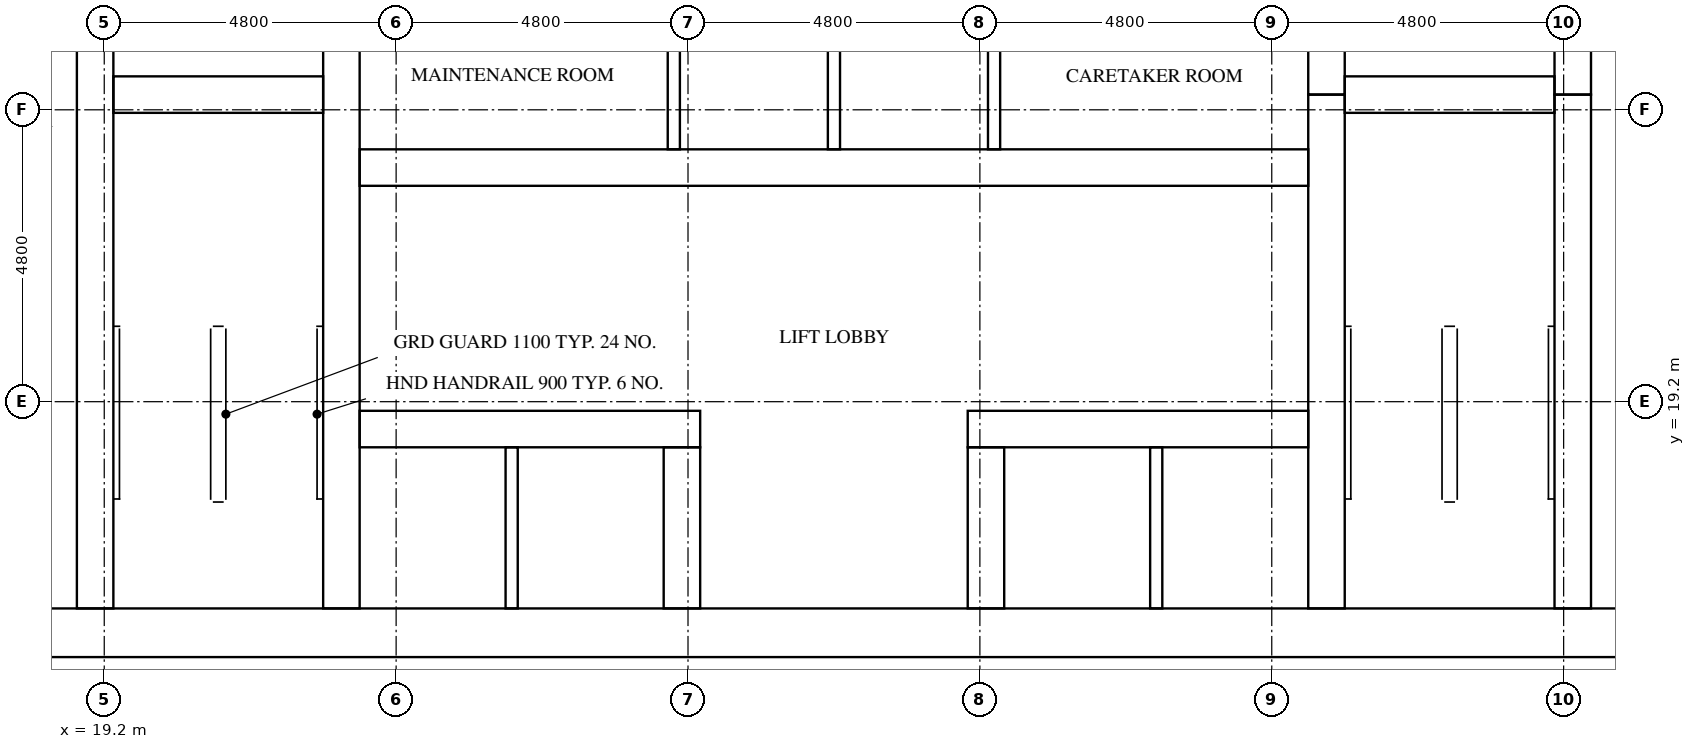
"""IFC4 building model, lengths in metres.
Left out: names, types, materials, properties, quantities, classifications, styles, units other than length and angle.
Written with IfcOpenShell. Run it as: python <this file> out.ifc"""

import sys

from ifc_helpers import new_model, si_unit, direction, frame, frame_2d, origin, place, context, subcontext, project, spatial, rectangle, extrude, element, fill, save


model = new_model("IFC4")
c1 = context("Model", 3, precision=1e-05, world=origin(), true_north=direction((0.0, 1.0)))
c2 = subcontext(c1, "Body", "Model", "MODEL_VIEW")
j1 = project(units=[si_unit("LENGTHUNIT", "METRE"), si_unit("PLANEANGLEUNIT", "RADIAN")], contexts=[c1])
p1 = place(None, origin())
s1 = spatial("IfcSite", under=j1, at=p1, CompositionType="ELEMENT")
p2 = place(p1, origin())
s2 = spatial("IfcBuilding", under=s1, at=p2, CompositionType="ELEMENT")
p3 = place(p2, frame((0.0, 0.0, 119.1)))
s3 = spatial("IfcBuildingStorey", under=s2, at=p3, CompositionType="ELEMENT", Elevation=119.1)
p4 = place(p3, frame((15.0, 15.4, 0.0), z_axis=(0.0, 0.0, 1.0), x_axis=(1.0, 0.0, 0.0)))
e1 = element("IfcWall", 1, at=p4, inside=s3, PredefinedType="SHEAR", context=c2, shape_type="SweptSolid", body=[
    extrude(rectangle(XDim=32.4, YDim=0.8, at=frame_2d((16.2, 0.0))), origin(), (0.0, 0.0, 1.0), 3.2),
])
p5 = place(p4, frame((15.3, 0.0, 0.0)))
e2 = element("IfcOpeningElement", 2, at=p5, cuts=e1, PredefinedType="OPENING", context=c2, shape_type="SweptSolid", body=[
    extrude(rectangle(XDim=1.8, YDim=2.1, at=frame_2d((0.9, 1.05))), frame((0.0, 0.41, 0.0), z_axis=(0.0, -1.0, 0.0), x_axis=(1.0, 0.0, 0.0)), (0.0, 0.0, 1.0), 0.82),
])
p6 = place(p3, frame((19.05, 15.8, 0.0), z_axis=(0.0, 0.0, 1.0), x_axis=(0.0, 1.0, 0.0)))
e3 = element("IfcWall", 3, at=p6, inside=s3, PredefinedType="SHEAR", context=c2, shape_type="SweptSolid", body=[
    extrude(rectangle(XDim=15.15, YDim=0.6, at=frame_2d((7.575, 0.0))), origin(), (0.0, 0.0, 1.0), 3.2),
])
p7 = place(p6, frame((9.65, 0.0, 0.0)))
e4 = element("IfcOpeningElement", 4, at=p7, cuts=e3, PredefinedType="OPENING", context=c2, shape_type="SweptSolid", body=[
    extrude(rectangle(XDim=1.1, YDim=2.1, at=frame_2d((0.55, 1.05))), frame((0.0, 0.31, 0.0), z_axis=(0.0, -1.0, 0.0), x_axis=(1.0, 0.0, 0.0)), (0.0, 0.0, 1.0), 0.62),
])
p8 = place(p6, frame((13.15, 0.0, 0.0)))
e5 = element("IfcOpeningElement", 5, at=p8, cuts=e3, PredefinedType="OPENING", context=c2, shape_type="SweptSolid", body=[
    extrude(rectangle(XDim=1.1, YDim=2.1, at=frame_2d((0.55, 1.05))), frame((0.0, 0.31, 0.0), z_axis=(0.0, -1.0, 0.0), x_axis=(1.0, 0.0, 0.0)), (0.0, 0.0, 1.0), 0.62),
])
p9 = place(p6, frame((0.4, 0.0, 0.0)))
e6 = element("IfcOpeningElement", 6, at=p9, cuts=e3, PredefinedType="OPENING", context=c2, shape_type="SweptSolid", body=[
    extrude(rectangle(XDim=1.2, YDim=2.1, at=frame_2d((0.6, 1.05))), frame((0.0, 0.31, 0.0), z_axis=(0.0, -1.0, 0.0), x_axis=(1.0, 0.0, 0.0)), (0.0, 0.0, 1.0), 0.62),
])
p10 = place(p3, frame((23.1, 15.8, 0.0), z_axis=(0.0, 0.0, 1.0), x_axis=(0.0, 1.0, 0.0)))
e7 = element("IfcWall", 7, at=p10, inside=s3, PredefinedType="SHEAR", context=c2, shape_type="SweptSolid", body=[
    extrude(rectangle(XDim=21.2, YDim=0.6, at=frame_2d((10.6, 0.0))), origin(), (0.0, 0.0, 1.0), 3.2),
])
p11 = place(p3, frame((39.3, 15.8, 0.0), z_axis=(0.0, 0.0, 1.0), x_axis=(0.0, 1.0, 0.0)))
e8 = element("IfcWall", 8, at=p11, inside=s3, PredefinedType="SHEAR", context=c2, shape_type="SweptSolid", body=[
    extrude(rectangle(XDim=8.45, YDim=0.6, at=frame_2d((4.225, 0.0))), origin(), (0.0, 0.0, 1.0), 3.2),
])
p12 = place(p3, frame((39.3, 24.25, 0.0), z_axis=(0.0, 0.0, 1.0), x_axis=(0.0, 1.0, 0.0)))
e9 = element("IfcWall", 9, at=p12, inside=s3, PredefinedType="SHEAR", context=c2, shape_type="SweptSolid", body=[
    extrude(rectangle(XDim=3.5, YDim=0.6, at=frame_2d((1.75, 0.0))), origin(), (0.0, 0.0, 1.0), 3.2),
])
p13 = place(p3, frame((43.35, 15.8, 0.0), z_axis=(0.0, 0.0, 1.0), x_axis=(0.0, 1.0, 0.0)))
e10 = element("IfcWall", 10, at=p13, inside=s3, PredefinedType="SHEAR", context=c2, shape_type="SweptSolid", body=[
    extrude(rectangle(XDim=8.45, YDim=0.6, at=frame_2d((4.225, 0.0))), origin(), (0.0, 0.0, 1.0), 3.2),
])
p14 = place(p13, frame((0.4, 0.0, 0.0)))
e11 = element("IfcOpeningElement", 11, at=p14, cuts=e10, PredefinedType="OPENING", context=c2, shape_type="SweptSolid", body=[
    extrude(rectangle(XDim=1.2, YDim=2.1, at=frame_2d((0.6, 1.05))), frame((0.0, 0.31, 0.0), z_axis=(0.0, -1.0, 0.0), x_axis=(1.0, 0.0, 0.0)), (0.0, 0.0, 1.0), 0.62),
])
p15 = place(p3, frame((43.35, 24.25, 0.0), z_axis=(0.0, 0.0, 1.0), x_axis=(0.0, 1.0, 0.0)))
e12 = element("IfcWall", 12, at=p15, inside=s3, PredefinedType="SHEAR", context=c2, shape_type="SweptSolid", body=[
    extrude(rectangle(XDim=3.5, YDim=0.6, at=frame_2d((1.75, 0.0))), origin(), (0.0, 0.0, 1.0), 3.2),
])
p16 = place(p15, frame((1.2, 0.0, 0.0)))
e13 = element("IfcOpeningElement", 13, at=p16, cuts=e12, PredefinedType="OPENING", context=c2, shape_type="SweptSolid", body=[
    extrude(rectangle(XDim=1.1, YDim=2.1, at=frame_2d((0.55, 1.05))), frame((0.0, 0.31, 0.0), z_axis=(0.0, -1.0, 0.0), x_axis=(1.0, 0.0, 0.0)), (0.0, 0.0, 1.0), 0.62),
])
for number, where, z_axis, x_axis in (
    (14, (19.35, 24.25, 0.0), (0.0, 0.0, 1.0), (1.0, 0.0, 0.0)),
    (15, (39.6, 24.25, 0.0), (0.0, 0.0, 1.0), (1.0, 0.0, 0.0)),
):
    element("IfcWall", number, at=place(p3, frame(where, z_axis=z_axis, x_axis=x_axis)), inside=s3, PredefinedType="SHEAR", context=c2, shape_type="SweptSolid", body=[
        extrude(rectangle(XDim=3.45, YDim=0.6, at=frame_2d((1.725, 0.0))), origin(), (0.0, 0.0, 1.0), 3.2),
    ])
p17 = place(p3, frame((23.4, 18.75, 0.0), z_axis=(0.0, 0.0, 1.0), x_axis=(1.0, 0.0, 0.0)))
e16 = element("IfcWall", 16, at=p17, inside=s3, PredefinedType="SHEAR", context=c2, shape_type="SweptSolid", body=[
    extrude(rectangle(XDim=5.6, YDim=0.6, at=frame_2d((2.8, 0.0))), origin(), (0.0, 0.0, 1.0), 3.2),
])
p18 = place(p17, frame((0.65, 0.0, 0.0)))
e17 = element("IfcOpeningElement", 17, at=p18, cuts=e16, PredefinedType="OPENING", context=c2, shape_type="SweptSolid", body=[
    extrude(rectangle(XDim=1.1, YDim=2.1, at=frame_2d((0.55, 1.05))), frame((0.0, 0.31, 0.0), z_axis=(0.0, -1.0, 0.0), x_axis=(1.0, 0.0, 0.0)), (0.0, 0.0, 1.0), 0.62),
])
p19 = place(p17, frame((3.25, 0.0, 0.0)))
e18 = element("IfcOpeningElement", 18, at=p19, cuts=e16, PredefinedType="OPENING", context=c2, shape_type="SweptSolid", body=[
    extrude(rectangle(XDim=1.1, YDim=2.1, at=frame_2d((0.55, 1.05))), frame((0.0, 0.31, 0.0), z_axis=(0.0, -1.0, 0.0), x_axis=(1.0, 0.0, 0.0)), (0.0, 0.0, 1.0), 0.62),
])
p20 = place(p3, frame((33.4, 18.75, 0.0), z_axis=(0.0, 0.0, 1.0), x_axis=(1.0, 0.0, 0.0)))
e19 = element("IfcWall", 19, at=p20, inside=s3, PredefinedType="SHEAR", context=c2, shape_type="SweptSolid", body=[
    extrude(rectangle(XDim=5.6, YDim=0.6, at=frame_2d((2.8, 0.0))), origin(), (0.0, 0.0, 1.0), 3.2),
])
p21 = place(p20, frame((1.25, 0.0, 0.0)))
e20 = element("IfcOpeningElement", 20, at=p21, cuts=e19, PredefinedType="OPENING", context=c2, shape_type="SweptSolid", body=[
    extrude(rectangle(XDim=1.1, YDim=2.1, at=frame_2d((0.55, 1.05))), frame((0.0, 0.31, 0.0), z_axis=(0.0, -1.0, 0.0), x_axis=(1.0, 0.0, 0.0)), (0.0, 0.0, 1.0), 0.62),
])
p22 = place(p20, frame((3.85, 0.0, 0.0)))
e21 = element("IfcOpeningElement", 21, at=p22, cuts=e19, PredefinedType="OPENING", context=c2, shape_type="SweptSolid", body=[
    extrude(rectangle(XDim=1.1, YDim=2.1, at=frame_2d((0.55, 1.05))), frame((0.0, 0.31, 0.0), z_axis=(0.0, -1.0, 0.0), x_axis=(1.0, 0.0, 0.0)), (0.0, 0.0, 1.0), 0.62),
])
p23 = place(p3, frame((23.4, 23.05, 0.0), z_axis=(0.0, 0.0, 1.0), x_axis=(1.0, 0.0, 0.0)))
e22 = element("IfcWall", 22, at=p23, inside=s3, PredefinedType="SHEAR", context=c2, shape_type="SweptSolid", body=[
    extrude(rectangle(XDim=15.6, YDim=0.6, at=frame_2d((7.8, 0.0))), origin(), (0.0, 0.0, 1.0), 3.2),
])
p24 = place(p23, frame((2.033, 0.0, 0.0)))
e23 = element("IfcOpeningElement", 23, at=p24, cuts=e22, PredefinedType="OPENING", context=c2, shape_type="SweptSolid", body=[
    extrude(rectangle(XDim=1.0, YDim=2.1, at=frame_2d((0.5, 1.05))), frame((0.0, 0.31, 0.0), z_axis=(0.0, -1.0, 0.0), x_axis=(1.0, 0.0, 0.0)), (0.0, 0.0, 1.0), 0.62),
])
p25 = place(p23, frame((12.567, 0.0, 0.0)))
e24 = element("IfcOpeningElement", 24, at=p25, cuts=e22, PredefinedType="OPENING", context=c2, shape_type="SweptSolid", body=[
    extrude(rectangle(XDim=1.0, YDim=2.1, at=frame_2d((0.5, 1.05))), frame((0.0, 0.31, 0.0), z_axis=(0.0, -1.0, 0.0), x_axis=(1.0, 0.0, 0.0)), (0.0, 0.0, 1.0), 0.62),
])
for number, where, z_axis, x_axis in (
    (25, (28.7, 15.8, 0.0), (0.0, 0.0, 1.0), (0.0, 1.0, 0.0)),
    (26, (33.7, 15.8, 0.0), (0.0, 0.0, 1.0), (0.0, 1.0, 0.0)),
):
    element("IfcWall", number, at=place(p3, frame(where, z_axis=z_axis, x_axis=x_axis)), inside=s3, PredefinedType="SHEAR", context=c2, shape_type="SweptSolid", body=[
        extrude(rectangle(XDim=2.65, YDim=0.6, at=frame_2d((1.325, 0.0))), origin(), (0.0, 0.0, 1.0), 3.2),
    ])
for number, where, z_axis, x_axis in (
    (27, (28.567, 23.35, 0.0), (0.0, 0.0, 1.0), (0.0, 1.0, 0.0)),
    (28, (31.2, 23.35, 0.0), (0.0, 0.0, 1.0), (0.0, 1.0, 0.0)),
    (29, (33.833, 23.35, 0.0), (0.0, 0.0, 1.0), (0.0, 1.0, 0.0)),
):
    element("IfcWall", number, at=place(p3, frame(where, z_axis=z_axis, x_axis=x_axis)), inside=s3, PredefinedType="SOLIDWALL", context=c2, shape_type="SweptSolid", body=[
        extrude(rectangle(XDim=2.5, YDim=0.2, at=frame_2d((1.25, 0.0))), origin(), (0.0, 0.0, 1.0), 3.2),
    ])
for number, where, z_axis, x_axis in (
    (30, (25.9, 15.8, 0.0), (0.0, 0.0, 1.0), (0.0, 1.0, 0.0)),
    (31, (36.5, 15.8, 0.0), (0.0, 0.0, 1.0), (0.0, 1.0, 0.0)),
):
    element("IfcWall", number, at=place(p3, frame(where, z_axis=z_axis, x_axis=x_axis)), inside=s3, PredefinedType="SOLIDWALL", context=c2, shape_type="SweptSolid", body=[
        extrude(rectangle(XDim=2.65, YDim=0.2, at=frame_2d((1.325, 0.0))), origin(), (0.0, 0.0, 1.0), 3.2),
    ])
p26 = place(p18, origin())
e32 = element("IfcDoor", 32, at=p26, inside=s3, OperationType="DOUBLE_DOOR_SLIDING", PredefinedType="DOOR", context=c2, shape_type="SweptSolid", body=[
    extrude(rectangle(XDim=1.1, YDim=2.1, at=frame_2d((0.55, 1.05))), frame((0.0, 0.025, 0.0), z_axis=(0.0, -1.0, 0.0), x_axis=(1.0, 0.0, 0.0)), (0.0, 0.0, 1.0), 0.05),
])
fill(e17, e32)
p27 = place(p19, origin())
e33 = element("IfcDoor", 33, at=p27, inside=s3, OperationType="DOUBLE_DOOR_SLIDING", PredefinedType="DOOR", context=c2, shape_type="SweptSolid", body=[
    extrude(rectangle(XDim=1.1, YDim=2.1, at=frame_2d((0.55, 1.05))), frame((0.0, 0.025, 0.0), z_axis=(0.0, -1.0, 0.0), x_axis=(1.0, 0.0, 0.0)), (0.0, 0.0, 1.0), 0.05),
])
fill(e18, e33)
p28 = place(p21, origin())
e34 = element("IfcDoor", 34, at=p28, inside=s3, OperationType="DOUBLE_DOOR_SLIDING", PredefinedType="DOOR", context=c2, shape_type="SweptSolid", body=[
    extrude(rectangle(XDim=1.1, YDim=2.1, at=frame_2d((0.55, 1.05))), frame((0.0, 0.025, 0.0), z_axis=(0.0, -1.0, 0.0), x_axis=(1.0, 0.0, 0.0)), (0.0, 0.0, 1.0), 0.05),
])
fill(e20, e34)
p29 = place(p22, origin())
e35 = element("IfcDoor", 35, at=p29, inside=s3, OperationType="DOUBLE_DOOR_SLIDING", PredefinedType="DOOR", context=c2, shape_type="SweptSolid", body=[
    extrude(rectangle(XDim=1.1, YDim=2.1, at=frame_2d((0.55, 1.05))), frame((0.0, 0.025, 0.0), z_axis=(0.0, -1.0, 0.0), x_axis=(1.0, 0.0, 0.0)), (0.0, 0.0, 1.0), 0.05),
])
fill(e21, e35)
p30 = place(p9, frame((1.2, 0.0, 0.0), z_axis=(0.0, 0.0, 1.0), x_axis=(-1.0, 0.0, 0.0)))
e36 = element("IfcDoor", 36, at=p30, inside=s3, OperationType="SINGLE_SWING_RIGHT", PredefinedType="DOOR", context=c2, shape_type="SweptSolid", body=[
    extrude(rectangle(XDim=1.2, YDim=2.1, at=frame_2d((0.6, 1.05))), frame((0.0, 0.025, 0.0), z_axis=(0.0, -1.0, 0.0), x_axis=(1.0, 0.0, 0.0)), (0.0, 0.0, 1.0), 0.05),
])
fill(e6, e36)
p31 = place(p14, origin())
e37 = element("IfcDoor", 37, at=p31, inside=s3, OperationType="SINGLE_SWING_LEFT", PredefinedType="DOOR", context=c2, shape_type="SweptSolid", body=[
    extrude(rectangle(XDim=1.2, YDim=2.1, at=frame_2d((0.6, 1.05))), frame((0.0, 0.025, 0.0), z_axis=(0.0, -1.0, 0.0), x_axis=(1.0, 0.0, 0.0)), (0.0, 0.0, 1.0), 0.05),
])
fill(e11, e37)
p32 = place(p5, frame((1.8, 0.0, 0.0), z_axis=(0.0, 0.0, 1.0), x_axis=(-1.0, 0.0, 0.0)))
e38 = element("IfcDoor", 38, at=p32, inside=s3, OperationType="DOUBLE_DOOR_SINGLE_SWING", PredefinedType="DOOR", context=c2, shape_type="SweptSolid", body=[
    extrude(rectangle(XDim=1.8, YDim=2.1, at=frame_2d((0.9, 1.05))), frame((0.0, 0.025, 0.0), z_axis=(0.0, -1.0, 0.0), x_axis=(1.0, 0.0, 0.0)), (0.0, 0.0, 1.0), 0.05),
])
fill(e2, e38)
p33 = place(p24, frame((1.0, 0.0, 0.0), z_axis=(0.0, 0.0, 1.0), x_axis=(-1.0, 0.0, 0.0)))
e39 = element("IfcDoor", 39, at=p33, inside=s3, OperationType="SINGLE_SWING_LEFT", PredefinedType="DOOR", context=c2, shape_type="SweptSolid", body=[
    extrude(rectangle(XDim=1.0, YDim=2.1, at=frame_2d((0.5, 1.05))), frame((0.0, 0.025, 0.0), z_axis=(0.0, -1.0, 0.0), x_axis=(1.0, 0.0, 0.0)), (0.0, 0.0, 1.0), 0.05),
])
fill(e23, e39)
p34 = place(p25, frame((1.0, 0.0, 0.0), z_axis=(0.0, 0.0, 1.0), x_axis=(-1.0, 0.0, 0.0)))
e40 = element("IfcDoor", 40, at=p34, inside=s3, OperationType="SINGLE_SWING_RIGHT", PredefinedType="DOOR", context=c2, shape_type="SweptSolid", body=[
    extrude(rectangle(XDim=1.0, YDim=2.1, at=frame_2d((0.5, 1.05))), frame((0.0, 0.025, 0.0), z_axis=(0.0, -1.0, 0.0), x_axis=(1.0, 0.0, 0.0)), (0.0, 0.0, 1.0), 0.05),
])
fill(e24, e40)
save(model, sys.argv[1])
